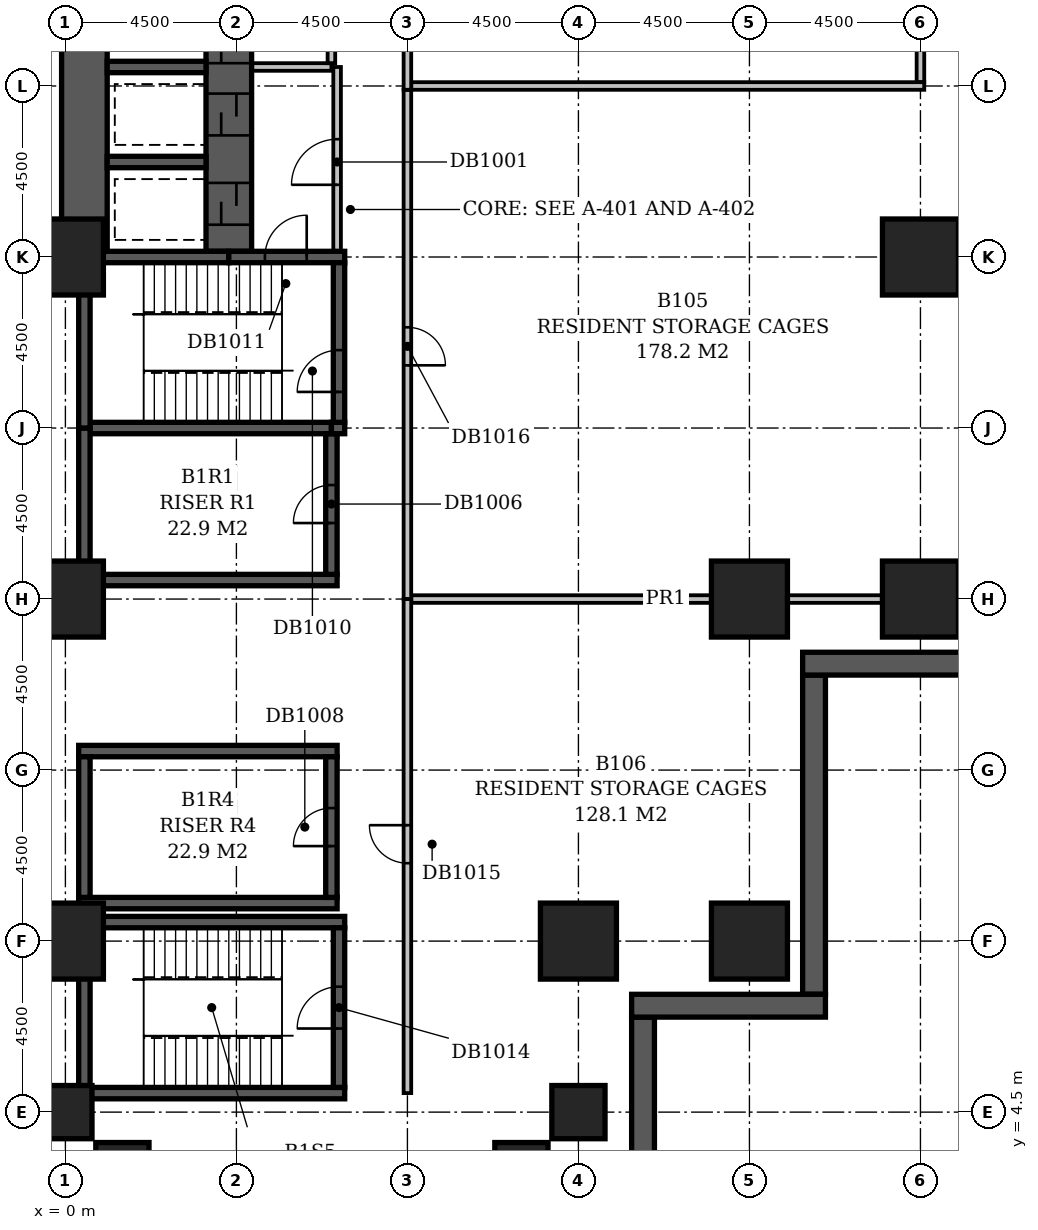
"""IFC4 building model, lengths in metres.
Left out: names, types, materials, properties, quantities, classifications, styles, units other than length and angle.
Written with IfcOpenShell. Run it as: python <this file> out.ifc"""

import sys

from ifc_helpers import new_model, si_unit, direction, frame, frame_2d, origin, origin_2d, place, context, subcontext, project, spatial, rectangle, extrude, element, fill, save


model = new_model("IFC4")
c1 = context("Model", 3, precision=1e-05, world=origin(), true_north=direction((0.0, 1.0)))
c2 = subcontext(c1, "Body", "Model", "MODEL_VIEW")
j1 = project(units=[si_unit("LENGTHUNIT", "METRE"), si_unit("PLANEANGLEUNIT", "RADIAN")], contexts=[c1])
p1 = place(None, origin())
s1 = spatial("IfcSite", under=j1, at=p1, CompositionType="ELEMENT")
p2 = place(p1, origin())
s2 = spatial("IfcBuilding", under=s1, at=p2, CompositionType="ELEMENT")
p3 = place(p2, frame((0.0, 0.0, -4.5)))
s3 = spatial("IfcBuildingStorey", under=s2, at=p3, CompositionType="ELEMENT", Elevation=-4.5)
for number, where, z_axis, x_axis in (
    (1, (1.5, 3.0, -0.4), (0.0, 0.0, 1.0), (1.0, 0.0, 0.0)),
    (2, (12.0, 3.0, -0.4), (0.0, 0.0, 1.0), (1.0, 0.0, 0.0)),
    (3, (0.0, 4.5, -0.4), (0.0, 0.0, 1.0), (1.0, 0.0, 0.0)),
    (4, (13.5, 4.5, -0.4), (0.0, 0.0, 1.0), (1.0, 0.0, 0.0)),
):
    element("IfcColumn", number, at=place(p3, frame(where, z_axis=z_axis, x_axis=x_axis)), inside=s3, PredefinedType="COLUMN", context=c2, shape_type="SweptSolid", body=[
        extrude(rectangle(XDim=1.4, YDim=1.4, at=origin_2d()), origin(), (0.0, 0.0, 1.0), 4.45),
    ])
for number, where, z_axis, x_axis in (
    (5, (0.0, 9.0, -0.4), (0.0, 0.0, 1.0), (1.0, 0.0, 0.0)),
    (6, (13.5, 9.0, -0.4), (0.0, 0.0, 1.0), (1.0, 0.0, 0.0)),
    (7, (18.0, 9.0, -0.4), (0.0, 0.0, 1.0), (1.0, 0.0, 0.0)),
    (8, (0.0, 18.0, -0.4), (0.0, 0.0, 1.0), (1.0, 0.0, 0.0)),
    (9, (18.0, 18.0, -0.4), (0.0, 0.0, 1.0), (1.0, 0.0, 0.0)),
    (10, (22.5, 18.0, -0.4), (0.0, 0.0, 1.0), (1.0, 0.0, 0.0)),
    (11, (0.0, 27.0, -0.4), (0.0, 0.0, 1.0), (1.0, 0.0, 0.0)),
    (12, (22.5, 27.0, -0.4), (0.0, 0.0, 1.0), (1.0, 0.0, 0.0)),
):
    element("IfcColumn", number, at=place(p3, frame(where, z_axis=z_axis, x_axis=x_axis)), inside=s3, PredefinedType="COLUMN", context=c2, shape_type="SweptSolid", body=[
        extrude(rectangle(XDim=2.0, YDim=2.0, at=origin_2d()), origin(), (0.0, 0.0, 1.0), 4.45),
    ])
p4 = place(p3, frame((24.5, 16.3, -0.4), z_axis=(0.0, 0.0, 1.0), x_axis=(-1.0, 0.0, 0.0)))
e13 = element("IfcWall", 13, at=p4, inside=s3, PredefinedType="SOLIDWALL", context=c2, shape_type="SweptSolid", body=[
    extrude(rectangle(XDim=5.1, YDim=0.6, at=frame_2d((2.55, 0.0))), origin(), (0.0, 0.0, 1.0), 4.45),
])
p5 = place(p3, frame((19.7, 16.0, -0.4), z_axis=(0.0, 0.0, 1.0), x_axis=(0.0, -1.0, 0.0)))
e14 = element("IfcWall", 14, at=p5, inside=s3, PredefinedType="SOLIDWALL", context=c2, shape_type="SweptSolid", body=[
    extrude(rectangle(XDim=8.4, YDim=0.6, at=frame_2d((4.2, 0.0))), origin(), (0.0, 0.0, 1.0), 4.45),
])
p6 = place(p3, frame((20.0, 7.3, -0.4), z_axis=(0.0, 0.0, 1.0), x_axis=(-1.0, 0.0, 0.0)))
e15 = element("IfcWall", 15, at=p6, inside=s3, PredefinedType="SOLIDWALL", context=c2, shape_type="SweptSolid", body=[
    extrude(rectangle(XDim=5.1, YDim=0.6, at=frame_2d((2.55, 0.0))), origin(), (0.0, 0.0, 1.0), 4.45),
])
p7 = place(p3, frame((15.2, 7.0, -0.4), z_axis=(0.0, 0.0, 1.0), x_axis=(0.0, -1.0, 0.0)))
e16 = element("IfcWall", 16, at=p7, inside=s3, PredefinedType="SOLIDWALL", context=c2, shape_type="SweptSolid", body=[
    extrude(rectangle(XDim=8.4, YDim=0.6, at=frame_2d((4.2, 0.0))), origin(), (0.0, 0.0, 1.0), 4.45),
])
for number, where, z_axis, x_axis in (
    (17, (0.35, 5.0, -0.4), (0.0, 0.0, 1.0), (1.0, 0.0, 0.0)),
    (18, (0.35, 9.5, -0.4), (0.0, 0.0, 1.0), (1.0, 0.0, 0.0)),
):
    element("IfcWall", number, at=place(p3, frame(where, z_axis=z_axis, x_axis=x_axis)), inside=s3, PredefinedType="SHEAR", context=c2, shape_type="SweptSolid", body=[
        extrude(rectangle(XDim=7.0, YDim=0.3, at=frame_2d((3.5, 0.0))), origin(), (0.0, 0.0, 1.0), 4.45),
    ])
for number, where, z_axis, x_axis in (
    (19, (0.35, 10.0, -0.4), (0.0, 0.0, 1.0), (1.0, 0.0, 0.0)),
    (20, (0.35, 14.0, -0.4), (0.0, 0.0, 1.0), (1.0, 0.0, 0.0)),
    (21, (0.35, 18.5, -0.4), (0.0, 0.0, 1.0), (1.0, 0.0, 0.0)),
):
    element("IfcWall", number, at=place(p3, frame(where, z_axis=z_axis, x_axis=x_axis)), inside=s3, PredefinedType="SHEAR", context=c2, shape_type="SweptSolid", body=[
        extrude(rectangle(XDim=6.8, YDim=0.3, at=frame_2d((3.4, 0.0))), origin(), (0.0, 0.0, 1.0), 4.45),
    ])
p8 = place(p3, frame((0.35, 22.5, -0.4), z_axis=(0.0, 0.0, 1.0), x_axis=(1.0, 0.0, 0.0)))
e22 = element("IfcWall", 22, at=p8, inside=s3, PredefinedType="SHEAR", context=c2, shape_type="SweptSolid", body=[
    extrude(rectangle(XDim=6.65, YDim=0.3, at=frame_2d((3.325, 0.0))), origin(), (0.0, 0.0, 1.0), 4.45),
])
p9 = place(p3, frame((7.0, 22.5, -0.4), z_axis=(0.0, 0.0, 1.0), x_axis=(1.0, 0.0, 0.0)))
e23 = element("IfcWall", 23, at=p9, inside=s3, PredefinedType="SHEAR", context=c2, shape_type="SweptSolid", body=[
    extrude(rectangle(XDim=0.35, YDim=0.3, at=frame_2d((0.175, 0.0))), origin(), (0.0, 0.0, 1.0), 4.45),
])
p10 = place(p3, frame((0.35, 27.0, -0.4), z_axis=(0.0, 0.0, 1.0), x_axis=(1.0, 0.0, 0.0)))
e24 = element("IfcWall", 24, at=p10, inside=s3, PredefinedType="SHEAR", context=c2, shape_type="SweptSolid", body=[
    extrude(rectangle(XDim=3.95, YDim=0.3, at=frame_2d((1.975, 0.0))), origin(), (0.0, 0.0, 1.0), 4.45),
])
p11 = place(p3, frame((4.3, 27.0, -0.4), z_axis=(0.0, 0.0, 1.0), x_axis=(1.0, 0.0, 0.0)))
e25 = element("IfcWall", 25, at=p11, inside=s3, PredefinedType="SHEAR", context=c2, shape_type="SweptSolid", body=[
    extrude(rectangle(XDim=3.05, YDim=0.3, at=frame_2d((1.525, 0.0))), origin(), (0.0, 0.0, 1.0), 4.45),
])
p12 = place(p11, frame((0.95, 0.0, 0.4)))
e26 = element("IfcOpeningElement", 26, at=p12, cuts=e25, PredefinedType="OPENING", context=c2, shape_type="SweptSolid", body=[
    extrude(rectangle(XDim=1.1, YDim=2.1, at=frame_2d((0.55, 1.05))), frame((0.0, 0.162, 0.0), z_axis=(0.0, -1.0, 0.0), x_axis=(1.0, 0.0, 0.0)), (0.0, 0.0, 1.0), 0.324),
])
for number, where, z_axis, x_axis in (
    (27, (1.1, 29.5, -0.4), (0.0, 0.0, 1.0), (1.0, 0.0, 0.0)),
    (28, (1.1, 32.0, -0.4), (0.0, 0.0, 1.0), (1.0, 0.0, 0.0)),
):
    element("IfcWall", number, at=place(p3, frame(where, z_axis=z_axis, x_axis=x_axis)), inside=s3, PredefinedType="SHEAR", context=c2, shape_type="SweptSolid", body=[
        extrude(rectangle(XDim=2.6, YDim=0.3, at=frame_2d((1.3, 0.0))), origin(), (0.0, 0.0, 1.0), 4.45),
    ])
p13 = place(p3, frame((0.5, 5.15, -0.4), z_axis=(0.0, 0.0, 1.0), x_axis=(0.0, 1.0, 0.0)))
e29 = element("IfcWall", 29, at=p13, inside=s3, PredefinedType="SHEAR", context=c2, shape_type="SweptSolid", body=[
    extrude(rectangle(XDim=4.2, YDim=0.3, at=frame_2d((2.1, 0.0))), origin(), (0.0, 0.0, 1.0), 4.45),
])
p14 = place(p3, frame((0.5, 10.15, -0.4), z_axis=(0.0, 0.0, 1.0), x_axis=(0.0, 1.0, 0.0)))
e30 = element("IfcWall", 30, at=p14, inside=s3, PredefinedType="SHEAR", context=c2, shape_type="SweptSolid", body=[
    extrude(rectangle(XDim=3.7, YDim=0.3, at=frame_2d((1.85, 0.0))), origin(), (0.0, 0.0, 1.0), 4.45),
])
p15 = place(p3, frame((0.5, 18.65, -0.4), z_axis=(0.0, 0.0, 1.0), x_axis=(0.0, 1.0, 0.0)))
e31 = element("IfcWall", 31, at=p15, inside=s3, PredefinedType="SHEAR", context=c2, shape_type="SweptSolid", body=[
    extrude(rectangle(XDim=3.85, YDim=0.3, at=frame_2d((1.925, 0.0))), origin(), (0.0, 0.0, 1.0), 4.45),
])
p16 = place(p3, frame((0.5, 22.5, -0.4), z_axis=(0.0, 0.0, 1.0), x_axis=(0.0, 1.0, 0.0)))
e32 = element("IfcWall", 32, at=p16, inside=s3, PredefinedType="SHEAR", context=c2, shape_type="SweptSolid", body=[
    extrude(rectangle(XDim=4.5, YDim=0.3, at=frame_2d((2.25, 0.0))), origin(), (0.0, 0.0, 1.0), 4.45),
])
p17 = place(p3, frame((0.5, 27.0, -0.4), z_axis=(0.0, 0.0, 1.0), x_axis=(0.0, 1.0, 0.0)))
e33 = element("IfcWall", 33, at=p17, inside=s3, PredefinedType="SHEAR", context=c2, shape_type="SweptSolid", body=[
    extrude(rectangle(XDim=6.9, YDim=1.2, at=frame_2d((3.45, 0.0))), origin(), (0.0, 0.0, 1.0), 4.45),
])
p18 = place(p3, frame((4.3, 27.15, -0.4), z_axis=(0.0, 0.0, 1.0), x_axis=(0.0, 1.0, 0.0)))
e34 = element("IfcWall", 34, at=p18, inside=s3, PredefinedType="SHEAR", context=c2, shape_type="SweptSolid", body=[
    extrude(rectangle(XDim=6.75, YDim=1.2, at=frame_2d((3.375, 0.0))), origin(), (0.0, 0.0, 1.0), 4.45),
])
p19 = place(p18, frame((3.05, 0.0, 0.4)))
e35 = element("IfcOpeningElement", 35, at=p19, cuts=e34, PredefinedType="OPENING", context=c2, shape_type="SweptSolid", body=[
    extrude(rectangle(XDim=1.1, YDim=2.1, at=frame_2d((0.55, 1.05))), frame((0.0, 0.612, 0.0), z_axis=(0.0, -1.0, 0.0), x_axis=(1.0, 0.0, 0.0)), (0.0, 0.0, 1.0), 1.224),
])
p20 = place(p18, frame((0.7, 0.0, 0.4)))
e36 = element("IfcOpeningElement", 36, at=p20, cuts=e34, PredefinedType="OPENING", context=c2, shape_type="SweptSolid", body=[
    extrude(rectangle(XDim=1.1, YDim=2.1, at=frame_2d((0.55, 1.05))), frame((0.0, 0.612, 0.0), z_axis=(0.0, -1.0, 0.0), x_axis=(1.0, 0.0, 0.0)), (0.0, 0.0, 1.0), 1.224),
])
p21 = place(p18, frame((4.95, 0.0, 0.4)))
e37 = element("IfcOpeningElement", 37, at=p21, cuts=e34, PredefinedType="OPENING", context=c2, shape_type="SweptSolid", body=[
    extrude(rectangle(XDim=1.1, YDim=2.1, at=frame_2d((0.55, 1.05))), frame((0.0, 0.612, 0.0), z_axis=(0.0, -1.0, 0.0), x_axis=(1.0, 0.0, 0.0)), (0.0, 0.0, 1.0), 1.224),
])
p22 = place(p3, frame((7.0, 10.15, -0.4), z_axis=(0.0, 0.0, 1.0), x_axis=(0.0, 1.0, 0.0)))
e38 = element("IfcWall", 38, at=p22, inside=s3, PredefinedType="SHEAR", context=c2, shape_type="SweptSolid", body=[
    extrude(rectangle(XDim=3.7, YDim=0.3, at=frame_2d((1.85, 0.0))), origin(), (0.0, 0.0, 1.0), 4.45),
])
p23 = place(p22, frame((1.35, 0.0, 0.4)))
e39 = element("IfcOpeningElement", 39, at=p23, cuts=e38, PredefinedType="OPENING", context=c2, shape_type="SweptSolid", body=[
    extrude(rectangle(XDim=1.0, YDim=2.1, at=frame_2d((0.5, 1.05))), frame((0.0, 0.162, 0.0), z_axis=(0.0, -1.0, 0.0), x_axis=(1.0, 0.0, 0.0)), (0.0, 0.0, 1.0), 0.324),
])
p24 = place(p3, frame((7.0, 18.65, -0.4), z_axis=(0.0, 0.0, 1.0), x_axis=(0.0, 1.0, 0.0)))
e40 = element("IfcWall", 40, at=p24, inside=s3, PredefinedType="SHEAR", context=c2, shape_type="SweptSolid", body=[
    extrude(rectangle(XDim=3.7, YDim=0.3, at=frame_2d((1.85, 0.0))), origin(), (0.0, 0.0, 1.0), 4.45),
])
p25 = place(p24, frame((1.35, 0.0, 0.4)))
e41 = element("IfcOpeningElement", 41, at=p25, cuts=e40, PredefinedType="OPENING", context=c2, shape_type="SweptSolid", body=[
    extrude(rectangle(XDim=1.0, YDim=2.1, at=frame_2d((0.5, 1.05))), frame((0.0, 0.162, 0.0), z_axis=(0.0, -1.0, 0.0), x_axis=(1.0, 0.0, 0.0)), (0.0, 0.0, 1.0), 0.324),
])
p26 = place(p3, frame((7.2, 5.15, -0.4), z_axis=(0.0, 0.0, 1.0), x_axis=(0.0, 1.0, 0.0)))
e42 = element("IfcWall", 42, at=p26, inside=s3, PredefinedType="SHEAR", context=c2, shape_type="SweptSolid", body=[
    extrude(rectangle(XDim=4.2, YDim=0.3, at=frame_2d((2.1, 0.0))), origin(), (0.0, 0.0, 1.0), 4.45),
])
p27 = place(p26, frame((1.55, 0.0, 0.4)))
e43 = element("IfcOpeningElement", 43, at=p27, cuts=e42, PredefinedType="OPENING", context=c2, shape_type="SweptSolid", body=[
    extrude(rectangle(XDim=1.1, YDim=2.1, at=frame_2d((0.55, 1.05))), frame((0.0, 0.162, 0.0), z_axis=(0.0, -1.0, 0.0), x_axis=(1.0, 0.0, 0.0)), (0.0, 0.0, 1.0), 0.324),
])
p28 = place(p3, frame((7.2, 22.65, -0.4), z_axis=(0.0, 0.0, 1.0), x_axis=(0.0, 1.0, 0.0)))
e44 = element("IfcWall", 44, at=p28, inside=s3, PredefinedType="SHEAR", context=c2, shape_type="SweptSolid", body=[
    extrude(rectangle(XDim=4.2, YDim=0.3, at=frame_2d((2.1, 0.0))), origin(), (0.0, 0.0, 1.0), 4.45),
])
p29 = place(p28, frame((0.8, 0.0, 0.4)))
e45 = element("IfcOpeningElement", 45, at=p29, cuts=e44, PredefinedType="OPENING", context=c2, shape_type="SweptSolid", body=[
    extrude(rectangle(XDim=1.1, YDim=2.1, at=frame_2d((0.55, 1.05))), frame((0.0, 0.162, 0.0), z_axis=(0.0, -1.0, 0.0), x_axis=(1.0, 0.0, 0.0)), (0.0, 0.0, 1.0), 0.324),
])
p30 = place(p3, frame((4.92, 32.0, 0.0), z_axis=(0.0, 0.0, 1.0), x_axis=(1.0, 0.0, 0.0)))
e46 = element("IfcWall", 46, at=p30, inside=s3, PredefinedType="PARTITIONING", context=c2, shape_type="SweptSolid", body=[
    extrude(rectangle(XDim=2.08, YDim=0.2, at=frame_2d((1.04, 0.0))), origin(), (0.0, 0.0, 1.0), 4.05),
])
p31 = place(p3, frame((7.0, 32.1, 0.0), z_axis=(0.0, 0.0, 1.0), x_axis=(0.0, 1.0, 0.0)))
e47 = element("IfcWall", 47, at=p31, inside=s3, PredefinedType="PARTITIONING", context=c2, shape_type="SweptSolid", body=[
    extrude(rectangle(XDim=2.4, YDim=0.2, at=frame_2d((1.2, 0.0))), origin(), (0.0, 0.0, 1.0), 4.05),
])
p32 = place(p31, frame((0.55, 0.0, 0.0)))
e48 = element("IfcOpeningElement", 48, at=p32, cuts=e47, PredefinedType="OPENING", context=c2, shape_type="SweptSolid", body=[
    extrude(rectangle(XDim=1.2, YDim=2.1, at=frame_2d((0.6, 1.05))), frame((0.0, 0.112, 0.0), z_axis=(0.0, -1.0, 0.0), x_axis=(1.0, 0.0, 0.0)), (0.0, 0.0, 1.0), 0.224),
])
p33 = place(p3, frame((7.15, 27.17, 0.0), z_axis=(0.0, 0.0, 1.0), x_axis=(0.0, 1.0, 0.0)))
e49 = element("IfcWall", 49, at=p33, inside=s3, PredefinedType="PARTITIONING", context=c2, shape_type="SweptSolid", body=[
    extrude(rectangle(XDim=4.83, YDim=0.2, at=frame_2d((2.415, 0.0))), origin(), (0.0, 0.0, 1.0), 4.05),
])
p34 = place(p33, frame((1.73, 0.0, 0.0)))
e50 = element("IfcOpeningElement", 50, at=p34, cuts=e49, PredefinedType="OPENING", context=c2, shape_type="SweptSolid", body=[
    extrude(rectangle(XDim=1.2, YDim=2.1, at=frame_2d((0.6, 1.05))), frame((0.0, 0.112, 0.0), z_axis=(0.0, -1.0, 0.0), x_axis=(1.0, 0.0, 0.0)), (0.0, 0.0, 1.0), 0.224),
])
p35 = place(p3, frame((9.0, 5.0, 0.0), z_axis=(0.0, 0.0, 1.0), x_axis=(0.0, 1.0, 0.0)))
e51 = element("IfcWall", 51, at=p35, inside=s3, PredefinedType="PARTITIONING", context=c2, shape_type="SweptSolid", body=[
    extrude(rectangle(XDim=13.0, YDim=0.2, at=frame_2d((6.5, 0.0))), origin(), (0.0, 0.0, 1.0), 4.05),
])
p36 = place(p35, frame((6.05, 0.0, 0.0)))
e52 = element("IfcOpeningElement", 52, at=p36, cuts=e51, PredefinedType="OPENING", context=c2, shape_type="SweptSolid", body=[
    extrude(rectangle(XDim=1.0, YDim=2.1, at=frame_2d((0.5, 1.05))), frame((0.0, 0.112, 0.0), z_axis=(0.0, -1.0, 0.0), x_axis=(1.0, 0.0, 0.0)), (0.0, 0.0, 1.0), 0.224),
])
p37 = place(p3, frame((9.0, 18.0, 0.0), z_axis=(0.0, 0.0, 1.0), x_axis=(0.0, 1.0, 0.0)))
e53 = element("IfcWall", 53, at=p37, inside=s3, PredefinedType="PARTITIONING", context=c2, shape_type="SweptSolid", body=[
    extrude(rectangle(XDim=13.4, YDim=0.2, at=frame_2d((6.7, 0.0))), origin(), (0.0, 0.0, 1.0), 4.05),
])
p38 = place(p37, frame((6.15, 0.0, 0.0)))
e54 = element("IfcOpeningElement", 54, at=p38, cuts=e53, PredefinedType="OPENING", context=c2, shape_type="SweptSolid", body=[
    extrude(rectangle(XDim=1.0, YDim=2.1, at=frame_2d((0.5, 1.05))), frame((0.0, 0.112, 0.0), z_axis=(0.0, -1.0, 0.0), x_axis=(1.0, 0.0, 0.0)), (0.0, 0.0, 1.0), 0.224),
])
p39 = place(p3, frame((22.5, 18.0, 0.0), z_axis=(0.0, 0.0, 1.0), x_axis=(-1.0, 0.0, 0.0)))
e55 = element("IfcWall", 55, at=p39, inside=s3, PredefinedType="PARTITIONING", context=c2, shape_type="SweptSolid", body=[
    extrude(rectangle(XDim=13.4, YDim=0.2, at=frame_2d((6.7, 0.0))), origin(), (0.0, 0.0, 1.0), 3.3),
])
p40 = place(p3, frame((9.0, 31.4, 0.0), z_axis=(0.0, 0.0, 1.0), x_axis=(0.0, 1.0, 0.0)))
e56 = element("IfcWall", 56, at=p40, inside=s3, PredefinedType="PARTITIONING", context=c2, shape_type="SweptSolid", body=[
    extrude(rectangle(XDim=18.0, YDim=0.2, at=frame_2d((9.0, 0.0))), origin(), (0.0, 0.0, 1.0), 4.05),
])
p41 = place(p40, frame((8.4, 0.0, 0.0)))
e57 = element("IfcOpeningElement", 57, at=p41, cuts=e56, PredefinedType="OPENING", context=c2, shape_type="SweptSolid", body=[
    extrude(rectangle(XDim=1.2, YDim=2.1, at=frame_2d((0.6, 1.05))), frame((0.0, 0.112, 0.0), z_axis=(0.0, -1.0, 0.0), x_axis=(1.0, 0.0, 0.0)), (0.0, 0.0, 1.0), 0.224),
])
p42 = place(p3, frame((22.6, 31.5, 0.0), z_axis=(0.0, 0.0, 1.0), x_axis=(-1.0, 0.0, 0.0)))
e58 = element("IfcWall", 58, at=p42, inside=s3, PredefinedType="PARTITIONING", context=c2, shape_type="SweptSolid", body=[
    extrude(rectangle(XDim=13.5, YDim=0.2, at=frame_2d((6.75, 0.0))), origin(), (0.0, 0.0, 1.0), 4.05),
])
p43 = place(p3, frame((22.5, 49.4, 0.0), z_axis=(0.0, 0.0, 1.0), x_axis=(0.0, -1.0, 0.0)))
e59 = element("IfcWall", 59, at=p43, inside=s3, PredefinedType="PARTITIONING", context=c2, shape_type="SweptSolid", body=[
    extrude(rectangle(XDim=17.8, YDim=0.2, at=frame_2d((8.9, 0.0))), origin(), (0.0, 0.0, 1.0), 3.3),
])
p44 = place(p34, origin())
e60 = element("IfcDoor", 60, at=p44, inside=s3, OperationType="SINGLE_SWING_LEFT", PredefinedType="DOOR", context=c2, shape_type="SweptSolid", body=[
    extrude(rectangle(XDim=1.2, YDim=2.1, at=frame_2d((0.6, 1.05))), frame((0.0, 0.025, 0.0), z_axis=(0.0, -1.0, 0.0), x_axis=(1.0, 0.0, 0.0)), (0.0, 0.0, 1.0), 0.05),
])
fill(e50, e60)
p45 = place(p19, origin())
e61 = element("IfcDoor", 61, at=p45, inside=s3, OperationType="SLIDING_TO_LEFT", PredefinedType="DOOR", context=c2, shape_type="SweptSolid", body=[
    extrude(rectangle(XDim=1.1, YDim=2.1, at=frame_2d((0.55, 1.05))), frame((0.0, 0.025, 0.0), z_axis=(0.0, -1.0, 0.0), x_axis=(1.0, 0.0, 0.0)), (0.0, 0.0, 1.0), 0.05),
])
fill(e35, e61)
p46 = place(p20, origin())
e62 = element("IfcDoor", 62, at=p46, inside=s3, OperationType="SLIDING_TO_LEFT", PredefinedType="DOOR", context=c2, shape_type="SweptSolid", body=[
    extrude(rectangle(XDim=1.1, YDim=2.1, at=frame_2d((0.55, 1.05))), frame((0.0, 0.025, 0.0), z_axis=(0.0, -1.0, 0.0), x_axis=(1.0, 0.0, 0.0)), (0.0, 0.0, 1.0), 0.05),
])
fill(e36, e62)
p47 = place(p21, origin())
e63 = element("IfcDoor", 63, at=p47, inside=s3, OperationType="SLIDING_TO_LEFT", PredefinedType="DOOR", context=c2, shape_type="SweptSolid", body=[
    extrude(rectangle(XDim=1.1, YDim=2.1, at=frame_2d((0.55, 1.05))), frame((0.0, 0.025, 0.0), z_axis=(0.0, -1.0, 0.0), x_axis=(1.0, 0.0, 0.0)), (0.0, 0.0, 1.0), 0.05),
])
fill(e37, e63)
p48 = place(p25, origin())
e64 = element("IfcDoor", 64, at=p48, inside=s3, OperationType="SINGLE_SWING_LEFT", PredefinedType="DOOR", context=c2, shape_type="SweptSolid", body=[
    extrude(rectangle(XDim=1.0, YDim=2.1, at=frame_2d((0.5, 1.05))), frame((0.0, 0.025, 0.0), z_axis=(0.0, -1.0, 0.0), x_axis=(1.0, 0.0, 0.0)), (0.0, 0.0, 1.0), 0.05),
])
fill(e41, e64)
p49 = place(p23, origin())
e65 = element("IfcDoor", 65, at=p49, inside=s3, OperationType="SINGLE_SWING_LEFT", PredefinedType="DOOR", context=c2, shape_type="SweptSolid", body=[
    extrude(rectangle(XDim=1.0, YDim=2.1, at=frame_2d((0.5, 1.05))), frame((0.0, 0.025, 0.0), z_axis=(0.0, -1.0, 0.0), x_axis=(1.0, 0.0, 0.0)), (0.0, 0.0, 1.0), 0.05),
])
fill(e39, e65)
p50 = place(p29, origin())
e66 = element("IfcDoor", 66, at=p50, inside=s3, OperationType="SINGLE_SWING_LEFT", PredefinedType="DOOR", context=c2, shape_type="SweptSolid", body=[
    extrude(rectangle(XDim=1.1, YDim=2.1, at=frame_2d((0.55, 1.05))), frame((0.0, 0.025, 0.0), z_axis=(0.0, -1.0, 0.0), x_axis=(1.0, 0.0, 0.0)), (0.0, 0.0, 1.0), 0.05),
])
fill(e45, e66)
p51 = place(p12, frame((1.1, 0.0, 0.0), z_axis=(0.0, 0.0, 1.0), x_axis=(-1.0, 0.0, 0.0)))
e67 = element("IfcDoor", 67, at=p51, inside=s3, OperationType="SINGLE_SWING_LEFT", PredefinedType="DOOR", context=c2, shape_type="SweptSolid", body=[
    extrude(rectangle(XDim=1.1, YDim=2.1, at=frame_2d((0.55, 1.05))), frame((0.0, 0.025, 0.0), z_axis=(0.0, -1.0, 0.0), x_axis=(1.0, 0.0, 0.0)), (0.0, 0.0, 1.0), 0.05),
])
fill(e26, e67)
p52 = place(p27, origin())
e68 = element("IfcDoor", 68, at=p52, inside=s3, OperationType="SINGLE_SWING_LEFT", PredefinedType="DOOR", context=c2, shape_type="SweptSolid", body=[
    extrude(rectangle(XDim=1.1, YDim=2.1, at=frame_2d((0.55, 1.05))), frame((0.0, 0.025, 0.0), z_axis=(0.0, -1.0, 0.0), x_axis=(1.0, 0.0, 0.0)), (0.0, 0.0, 1.0), 0.05),
])
fill(e43, e68)
p53 = place(p36, frame((1.0, 0.0, 0.0), z_axis=(0.0, 0.0, 1.0), x_axis=(-1.0, 0.0, 0.0)))
e69 = element("IfcDoor", 69, at=p53, inside=s3, OperationType="SINGLE_SWING_LEFT", PredefinedType="DOOR", context=c2, shape_type="SweptSolid", body=[
    extrude(rectangle(XDim=1.0, YDim=2.1, at=frame_2d((0.5, 1.05))), frame((0.0, 0.025, 0.0), z_axis=(0.0, -1.0, 0.0), x_axis=(1.0, 0.0, 0.0)), (0.0, 0.0, 1.0), 0.05),
])
fill(e52, e69)
p54 = place(p38, frame((1.0, 0.0, 0.0), z_axis=(0.0, 0.0, 1.0), x_axis=(-1.0, 0.0, 0.0)))
e70 = element("IfcDoor", 70, at=p54, inside=s3, OperationType="SINGLE_SWING_RIGHT", PredefinedType="DOOR", context=c2, shape_type="SweptSolid", body=[
    extrude(rectangle(XDim=1.0, YDim=2.1, at=frame_2d((0.5, 1.05))), frame((0.0, 0.025, 0.0), z_axis=(0.0, -1.0, 0.0), x_axis=(1.0, 0.0, 0.0)), (0.0, 0.0, 1.0), 0.05),
])
fill(e54, e70)
save(model, sys.argv[1])
